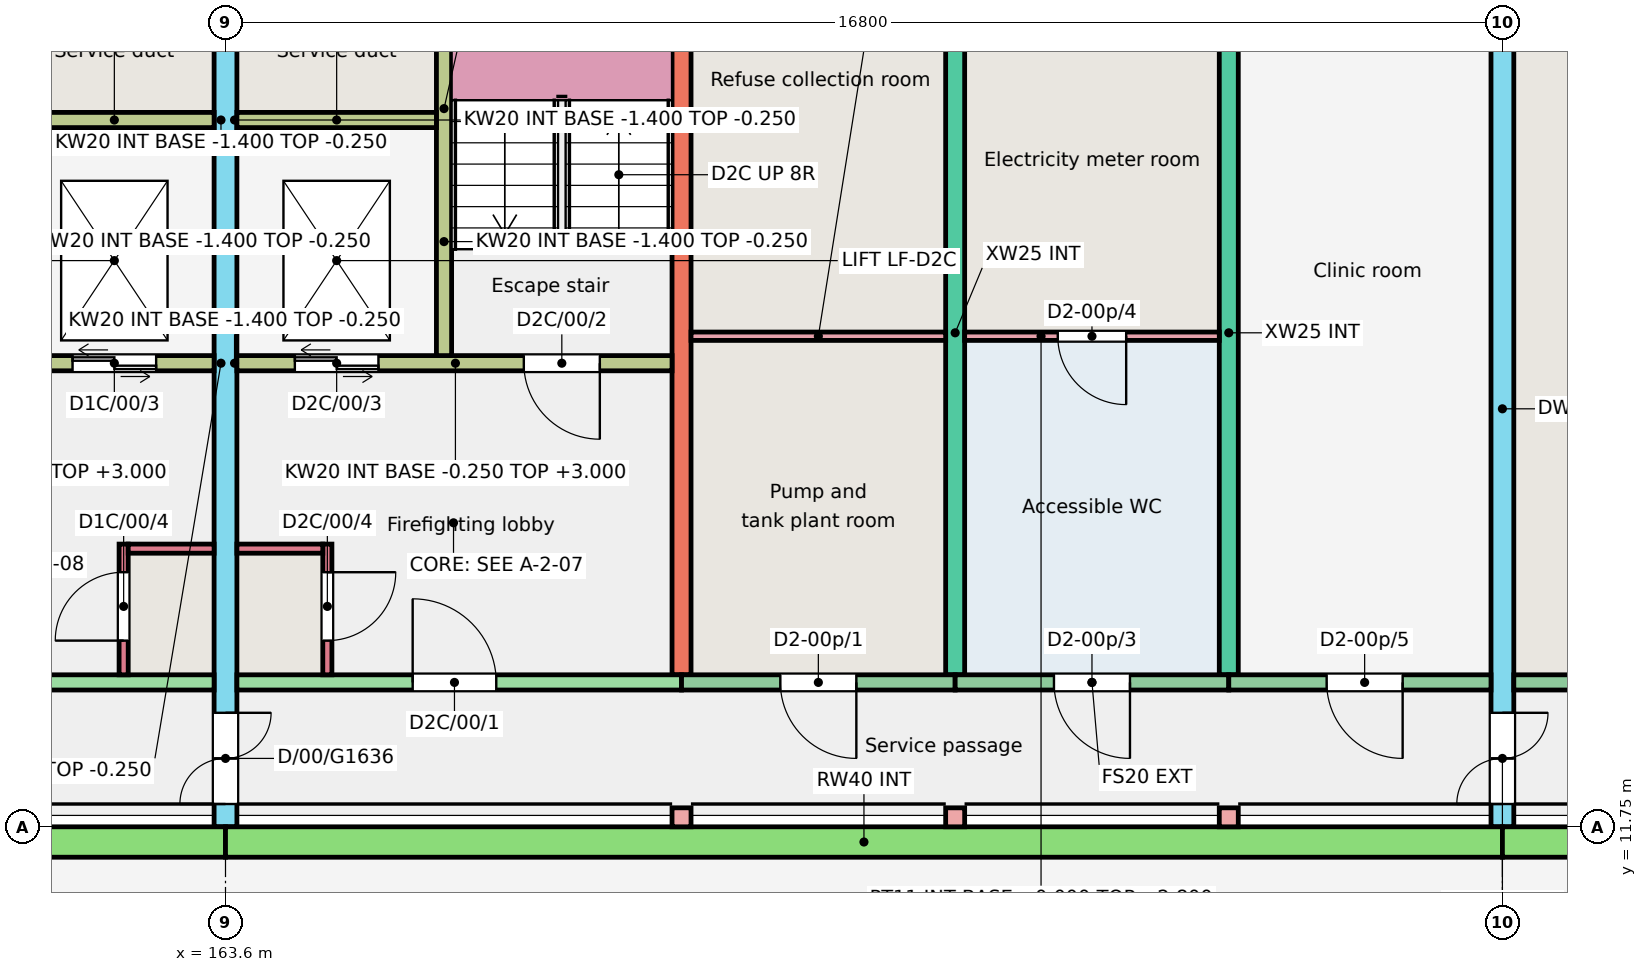
"""IFC4 building model, lengths in metres.
Left out: names, types, materials, properties, quantities, classifications, styles, units other than length and angle.
Written with IfcOpenShell. Run it as: python <this file> out.ifc"""

import sys

from ifc_helpers import new_model, si_unit, direction, frame, frame_2d, origin, origin_2d, place, context, subcontext, project, spatial, rectangle, extrude, element, fill, save


model = new_model("IFC4")
c1 = context("Model", 3, precision=1e-05, world=origin(), true_north=direction((0.0, 1.0)))
c2 = subcontext(c1, "Body", "Model", "MODEL_VIEW")
j1 = project(units=[si_unit("LENGTHUNIT", "METRE"), si_unit("PLANEANGLEUNIT", "RADIAN")], contexts=[c1])
p1 = place(None, origin())
s1 = spatial("IfcSite", under=j1, at=p1, CompositionType="ELEMENT")
p2 = place(p1, origin())
s2 = spatial("IfcBuilding", under=s1, at=p2, CompositionType="ELEMENT")
p3 = place(p2, origin())
s3 = spatial("IfcBuildingStorey", under=s2, at=p3, CompositionType="ELEMENT", Elevation=0.0)
p4 = place(p3, frame((163.6, 11.75, -0.25), z_axis=(0.0, 0.0, 1.0), x_axis=(0.0, 1.0, 0.0)))
e1 = element("IfcWall", 1, at=p4, inside=s3, PredefinedType="SHEAR", context=c2, shape_type="SweptSolid", body=[
    extrude(rectangle(XDim=11.0, YDim=0.3, at=frame_2d((5.5, 0.0))), origin(), (0.0, 0.0, 1.0), 3.25),
])
p5 = place(p4, frame((0.3, 0.0, 0.25)))
e2 = element("IfcOpeningElement", 2, at=p5, cuts=e1, PredefinedType="OPENING", context=c2, shape_type="SweptSolid", body=[
    extrude(rectangle(XDim=1.2, YDim=2.1, at=frame_2d((0.6, 1.05))), frame((0.0, 0.16, 0.0), z_axis=(0.0, -1.0, 0.0), x_axis=(1.0, 0.0, 0.0)), (0.0, 0.0, 1.0), 0.32),
])
for number, where, z_axis, x_axis in (
    (3, (169.6, 13.75, -0.25), (0.0, 0.0, 1.0), (0.0, 1.0, 0.0)),
    (4, (173.2, 13.75, -0.25), (0.0, 0.0, 1.0), (0.0, 1.0, 0.0)),
    (5, (176.8, 13.75, -0.25), (0.0, 0.0, 1.0), (0.0, 1.0, 0.0)),
):
    element("IfcWall", number, at=place(p3, frame(where, z_axis=z_axis, x_axis=x_axis)), inside=s3, PredefinedType="SHEAR", context=c2, shape_type="SweptSolid", body=[
        extrude(rectangle(XDim=9.0, YDim=0.25, at=frame_2d((4.5, 0.0))), origin(), (0.0, 0.0, 1.0), 3.25),
    ])
p6 = place(p3, frame((180.4, 11.75, -0.25), z_axis=(0.0, 0.0, 1.0), x_axis=(0.0, 1.0, 0.0)))
e6 = element("IfcWall", 6, at=p6, inside=s3, PredefinedType="SHEAR", context=c2, shape_type="SweptSolid", body=[
    extrude(rectangle(XDim=11.0, YDim=0.3, at=frame_2d((5.5, 0.0))), origin(), (0.0, 0.0, 1.0), 3.25),
])
p7 = place(p6, frame((0.3, 0.0, 0.25)))
e7 = element("IfcOpeningElement", 7, at=p7, cuts=e6, PredefinedType="OPENING", context=c2, shape_type="SweptSolid", body=[
    extrude(rectangle(XDim=1.2, YDim=2.1, at=frame_2d((0.6, 1.05))), frame((0.0, 0.16, 0.0), z_axis=(0.0, -1.0, 0.0), x_axis=(1.0, 0.0, 0.0)), (0.0, 0.0, 1.0), 0.32),
])
p8 = place(p3, frame((157.6, 13.65, -0.25), z_axis=(0.0, 0.0, 1.0), x_axis=(1.0, 0.0, 0.0)))
e8 = element("IfcWall", 8, at=p8, inside=s3, PredefinedType="SHEAR", context=c2, shape_type="SweptSolid", body=[
    extrude(rectangle(XDim=5.85, YDim=0.2, at=frame_2d((2.925, 0.0))), origin(), (0.0, 0.0, 1.0), 3.25),
])
p9 = place(p8, frame((2.438, 0.0, 0.25)))
e9 = element("IfcOpeningElement", 9, at=p9, cuts=e8, PredefinedType="OPENING", context=c2, shape_type="SweptSolid", body=[
    extrude(rectangle(XDim=1.1, YDim=2.1, at=frame_2d((0.55, 1.05))), frame((0.0, 0.11, 0.0), z_axis=(0.0, -1.0, 0.0), x_axis=(1.0, 0.0, 0.0)), (0.0, 0.0, 1.0), 0.22),
])
p10 = place(p3, frame((157.725, 17.85, -0.25), z_axis=(0.0, 0.0, 1.0), x_axis=(1.0, 0.0, 0.0)))
e10 = element("IfcWall", 10, at=p10, inside=s3, PredefinedType="SHEAR", context=c2, shape_type="SweptSolid", body=[
    extrude(rectangle(XDim=5.725, YDim=0.2, at=frame_2d((2.862, 0.0))), origin(), (0.0, 0.0, 1.0), 3.25),
])
p11 = place(p10, frame((0.95, 0.0, 0.25)))
e11 = element("IfcOpeningElement", 11, at=p11, cuts=e10, PredefinedType="OPENING", context=c2, shape_type="SweptSolid", body=[
    extrude(rectangle(XDim=1.0, YDim=2.1, at=frame_2d((0.5, 1.05))), frame((0.0, 0.11, 0.0), z_axis=(0.0, -1.0, 0.0), x_axis=(1.0, 0.0, 0.0)), (0.0, 0.0, 1.0), 0.22),
])
p12 = place(p10, frame((3.863, 0.0, 0.25)))
e12 = element("IfcOpeningElement", 12, at=p12, cuts=e10, PredefinedType="OPENING", context=c2, shape_type="SweptSolid", body=[
    extrude(rectangle(XDim=1.1, YDim=2.1, at=frame_2d((0.55, 1.05))), frame((0.0, 0.11, 0.0), z_axis=(0.0, -1.0, 0.0), x_axis=(1.0, 0.0, 0.0)), (0.0, 0.0, 1.0), 0.22),
])
p13 = place(p3, frame((160.825, 21.05, -0.25), z_axis=(0.0, 0.0, 1.0), x_axis=(1.0, 0.0, 0.0)))
e13 = element("IfcWall", 13, at=p13, inside=s3, PredefinedType="SHEAR", context=c2, shape_type="SweptSolid", body=[
    extrude(rectangle(XDim=2.625, YDim=0.2, at=frame_2d((1.312, 0.0))), origin(), (0.0, 0.0, 1.0), 3.25),
])
p14 = place(p3, frame((162.26, 13.75, -0.25), z_axis=(0.0, 0.0, 1.0), x_axis=(0.0, 1.0, 0.0)))
e14 = element("IfcWall", 14, at=p14, inside=s3, PredefinedType="SHEAR", context=c2, shape_type="SweptSolid", body=[
    extrude(rectangle(XDim=1.72, YDim=0.12, at=frame_2d((0.86, 0.0))), origin(), (0.0, 0.0, 1.0), 3.25),
])
p15 = place(p14, frame((0.45, 0.0, 0.25)))
e15 = element("IfcOpeningElement", 15, at=p15, cuts=e14, PredefinedType="OPENING", context=c2, shape_type="SweptSolid", body=[
    extrude(rectangle(XDim=0.9, YDim=2.1, at=frame_2d((0.45, 1.05))), frame((0.0, 0.07, 0.0), z_axis=(0.0, -1.0, 0.0), x_axis=(1.0, 0.0, 0.0)), (0.0, 0.0, 1.0), 0.14),
])
p16 = place(p3, frame((162.32, 15.41, -0.25), z_axis=(0.0, 0.0, 1.0), x_axis=(1.0, 0.0, 0.0)))
e16 = element("IfcWall", 16, at=p16, inside=s3, PredefinedType="SHEAR", context=c2, shape_type="SweptSolid", body=[
    extrude(rectangle(XDim=1.13, YDim=0.12, at=frame_2d((0.565, 0.0))), origin(), (0.0, 0.0, 1.0), 3.25),
])
p17 = place(p3, frame((163.75, 13.65, -0.25), z_axis=(0.0, 0.0, 1.0), x_axis=(1.0, 0.0, 0.0)))
e17 = element("IfcWall", 17, at=p17, inside=s3, PredefinedType="SHEAR", context=c2, shape_type="SweptSolid", body=[
    extrude(rectangle(XDim=5.85, YDim=0.2, at=frame_2d((2.925, 0.0))), origin(), (0.0, 0.0, 1.0), 3.25),
])
p18 = place(p17, frame((2.312, 0.0, 0.25)))
e18 = element("IfcOpeningElement", 18, at=p18, cuts=e17, PredefinedType="OPENING", context=c2, shape_type="SweptSolid", body=[
    extrude(rectangle(XDim=1.1, YDim=2.1, at=frame_2d((0.55, 1.05))), frame((0.0, 0.11, 0.0), z_axis=(0.0, -1.0, 0.0), x_axis=(1.0, 0.0, 0.0)), (0.0, 0.0, 1.0), 0.22),
])
p19 = place(p3, frame((163.75, 17.85, -0.25), z_axis=(0.0, 0.0, 1.0), x_axis=(1.0, 0.0, 0.0)))
e19 = element("IfcWall", 19, at=p19, inside=s3, PredefinedType="SHEAR", context=c2, shape_type="SweptSolid", body=[
    extrude(rectangle(XDim=5.725, YDim=0.2, at=frame_2d((2.863, 0.0))), origin(), (0.0, 0.0, 1.0), 3.25),
])
p20 = place(p19, frame((3.775, 0.0, 0.25)))
e20 = element("IfcOpeningElement", 20, at=p20, cuts=e19, PredefinedType="OPENING", context=c2, shape_type="SweptSolid", body=[
    extrude(rectangle(XDim=1.0, YDim=2.1, at=frame_2d((0.5, 1.05))), frame((0.0, 0.11, 0.0), z_axis=(0.0, -1.0, 0.0), x_axis=(1.0, 0.0, 0.0)), (0.0, 0.0, 1.0), 0.22),
])
p21 = place(p19, frame((0.762, 0.0, 0.25)))
e21 = element("IfcOpeningElement", 21, at=p21, cuts=e19, PredefinedType="OPENING", context=c2, shape_type="SweptSolid", body=[
    extrude(rectangle(XDim=1.1, YDim=2.1, at=frame_2d((0.55, 1.05))), frame((0.0, 0.11, 0.0), z_axis=(0.0, -1.0, 0.0), x_axis=(1.0, 0.0, 0.0)), (0.0, 0.0, 1.0), 0.22),
])
p22 = place(p3, frame((166.475, 17.95, -0.25), z_axis=(0.0, 0.0, 1.0), x_axis=(0.0, 1.0, 0.0)))
e22 = element("IfcWall", 22, at=p22, inside=s3, PredefinedType="SHEAR", context=c2, shape_type="SweptSolid", body=[
    extrude(rectangle(XDim=4.8, YDim=0.2, at=frame_2d((2.4, 0.0))), origin(), (0.0, 0.0, 1.0), 3.25),
])
p23 = place(p3, frame((163.75, 21.05, -0.25), z_axis=(0.0, 0.0, 1.0), x_axis=(1.0, 0.0, 0.0)))
e23 = element("IfcWall", 23, at=p23, inside=s3, PredefinedType="SHEAR", context=c2, shape_type="SweptSolid", body=[
    extrude(rectangle(XDim=2.625, YDim=0.2, at=frame_2d((1.312, 0.0))), origin(), (0.0, 0.0, 1.0), 3.25),
])
p24 = place(p3, frame((164.94, 13.75, -0.25), z_axis=(0.0, 0.0, 1.0), x_axis=(0.0, 1.0, 0.0)))
e24 = element("IfcWall", 24, at=p24, inside=s3, PredefinedType="SHEAR", context=c2, shape_type="SweptSolid", body=[
    extrude(rectangle(XDim=1.72, YDim=0.12, at=frame_2d((0.86, 0.0))), origin(), (0.0, 0.0, 1.0), 3.25),
])
p25 = place(p24, frame((0.45, 0.0, 0.25)))
e25 = element("IfcOpeningElement", 25, at=p25, cuts=e24, PredefinedType="OPENING", context=c2, shape_type="SweptSolid", body=[
    extrude(rectangle(XDim=0.9, YDim=2.1, at=frame_2d((0.45, 1.05))), frame((0.0, 0.07, 0.0), z_axis=(0.0, -1.0, 0.0), x_axis=(1.0, 0.0, 0.0)), (0.0, 0.0, 1.0), 0.14),
])
p26 = place(p3, frame((163.75, 15.41, -0.25), z_axis=(0.0, 0.0, 1.0), x_axis=(1.0, 0.0, 0.0)))
e26 = element("IfcWall", 26, at=p26, inside=s3, PredefinedType="SHEAR", context=c2, shape_type="SweptSolid", body=[
    extrude(rectangle(XDim=1.13, YDim=0.12, at=frame_2d((0.565, 0.0))), origin(), (0.0, 0.0, 1.0), 3.25),
])
p27 = place(p3, frame((169.6, 13.65, -0.25), z_axis=(0.0, 0.0, 1.0), x_axis=(1.0, 0.0, 0.0)))
e27 = element("IfcWall", 27, at=p27, inside=s3, PredefinedType="SOLIDWALL", context=c2, shape_type="SweptSolid", body=[
    extrude(rectangle(XDim=3.6, YDim=0.2, at=frame_2d((1.8, 0.0))), origin(), (0.0, 0.0, 1.0), 3.25),
])
p28 = place(p27, frame((1.3, 0.0, 0.25)))
e28 = element("IfcOpeningElement", 28, at=p28, cuts=e27, PredefinedType="OPENING", context=c2, shape_type="SweptSolid", body=[
    extrude(rectangle(XDim=1.0, YDim=2.1, at=frame_2d((0.5, 1.05))), frame((0.0, 0.11, 0.0), z_axis=(0.0, -1.0, 0.0), x_axis=(1.0, 0.0, 0.0)), (0.0, 0.0, 1.0), 0.22),
])
p29 = place(p3, frame((173.2, 13.65, -0.25), z_axis=(0.0, 0.0, 1.0), x_axis=(1.0, 0.0, 0.0)))
e29 = element("IfcWall", 29, at=p29, inside=s3, PredefinedType="SOLIDWALL", context=c2, shape_type="SweptSolid", body=[
    extrude(rectangle(XDim=3.6, YDim=0.2, at=frame_2d((1.8, 0.0))), origin(), (0.0, 0.0, 1.0), 3.25),
])
p30 = place(p29, frame((1.3, 0.0, 0.25)))
e30 = element("IfcOpeningElement", 30, at=p30, cuts=e29, PredefinedType="OPENING", context=c2, shape_type="SweptSolid", body=[
    extrude(rectangle(XDim=1.0, YDim=2.1, at=frame_2d((0.5, 1.05))), frame((0.0, 0.11, 0.0), z_axis=(0.0, -1.0, 0.0), x_axis=(1.0, 0.0, 0.0)), (0.0, 0.0, 1.0), 0.22),
])
p31 = place(p3, frame((176.8, 13.65, -0.25), z_axis=(0.0, 0.0, 1.0), x_axis=(1.0, 0.0, 0.0)))
e31 = element("IfcWall", 31, at=p31, inside=s3, PredefinedType="SOLIDWALL", context=c2, shape_type="SweptSolid", body=[
    extrude(rectangle(XDim=3.45, YDim=0.2, at=frame_2d((1.725, 0.0))), origin(), (0.0, 0.0, 1.0), 3.25),
])
p32 = place(p31, frame((1.288, 0.0, 0.25)))
e32 = element("IfcOpeningElement", 32, at=p32, cuts=e31, PredefinedType="OPENING", context=c2, shape_type="SweptSolid", body=[
    extrude(rectangle(XDim=1.0, YDim=2.1, at=frame_2d((0.5, 1.05))), frame((0.0, 0.11, 0.0), z_axis=(0.0, -1.0, 0.0), x_axis=(1.0, 0.0, 0.0)), (0.0, 0.0, 1.0), 0.22),
])
p33 = place(p3, frame((180.55, 13.65, -0.25), z_axis=(0.0, 0.0, 1.0), x_axis=(1.0, 0.0, 0.0)))
e33 = element("IfcWall", 33, at=p33, inside=s3, PredefinedType="SOLIDWALL", context=c2, shape_type="SweptSolid", body=[
    extrude(rectangle(XDim=3.45, YDim=0.2, at=frame_2d((1.725, 0.0))), origin(), (0.0, 0.0, 1.0), 3.25),
])
p34 = place(p33, frame((1.163, 0.0, 0.25)))
e34 = element("IfcOpeningElement", 34, at=p34, cuts=e33, PredefinedType="OPENING", context=c2, shape_type="SweptSolid", body=[
    extrude(rectangle(XDim=1.0, YDim=2.1, at=frame_2d((0.5, 1.05))), frame((0.0, 0.11, 0.0), z_axis=(0.0, -1.0, 0.0), x_axis=(1.0, 0.0, 0.0)), (0.0, 0.0, 1.0), 0.22),
])
for number, where, z_axis, x_axis in (
    (35, (169.6, 11.875, -0.25), (0.0, 0.0, 1.0), (1.0, 0.0, 0.0)),
    (36, (173.2, 11.875, -0.25), (0.0, 0.0, 1.0), (1.0, 0.0, 0.0)),
    (37, (176.8, 11.875, -0.25), (0.0, 0.0, 1.0), (1.0, 0.0, 0.0)),
):
    element("IfcColumn", number, at=place(p3, frame(where, z_axis=z_axis, x_axis=x_axis)), inside=s3, PredefinedType="COLUMN", context=c2, shape_type="SweptSolid", body=[
        extrude(rectangle(XDim=0.25, YDim=0.25, at=origin_2d()), origin(), (0.0, 0.0, 1.0), 3.25),
    ])
for number, where, z_axis, x_axis in (
    (38, (160.625, 17.85, -1.4), (0.0, 0.0, 1.0), (1.0, 0.0, 0.0)),
    (39, (160.625, 21.05, -1.4), (0.0, 0.0, 1.0), (1.0, 0.0, 0.0)),
):
    element("IfcWall", number, at=place(p3, frame(where, z_axis=z_axis, x_axis=x_axis)), inside=s3, PredefinedType="SHEAR", context=c2, shape_type="SweptSolid", body=[
        extrude(rectangle(XDim=2.975, YDim=0.2, at=frame_2d((1.488, 0.0))), origin(), (0.0, 0.0, 1.0), 1.15),
    ])
p35 = place(p3, frame((163.525, 17.95, -1.4), z_axis=(0.0, 0.0, 1.0), x_axis=(0.0, 1.0, 0.0)))
e40 = element("IfcWall", 40, at=p35, inside=s3, PredefinedType="SHEAR", context=c2, shape_type="SweptSolid", body=[
    extrude(rectangle(XDim=3.0, YDim=0.15, at=frame_2d((1.5, 0.0))), origin(), (0.0, 0.0, 1.0), 1.15),
])
for number, where, z_axis, x_axis in (
    (41, (163.6, 17.85, -1.4), (0.0, 0.0, 1.0), (1.0, 0.0, 0.0)),
    (42, (163.6, 21.05, -1.4), (0.0, 0.0, 1.0), (1.0, 0.0, 0.0)),
):
    element("IfcWall", number, at=place(p3, frame(where, z_axis=z_axis, x_axis=x_axis)), inside=s3, PredefinedType="SHEAR", context=c2, shape_type="SweptSolid", body=[
        extrude(rectangle(XDim=2.975, YDim=0.2, at=frame_2d((1.487, 0.0))), origin(), (0.0, 0.0, 1.0), 1.15),
    ])
p36 = place(p3, frame((166.475, 17.95, -1.4), z_axis=(0.0, 0.0, 1.0), x_axis=(0.0, 1.0, 0.0)))
e43 = element("IfcWall", 43, at=p36, inside=s3, PredefinedType="SHEAR", context=c2, shape_type="SweptSolid", body=[
    extrude(rectangle(XDim=3.0, YDim=0.2, at=frame_2d((1.5, 0.0))), origin(), (0.0, 0.0, 1.0), 1.15),
])
p37 = place(p3, frame((163.675, 17.95, -1.4), z_axis=(0.0, 0.0, 1.0), x_axis=(0.0, 1.0, 0.0)))
e44 = element("IfcWall", 44, at=p37, inside=s3, PredefinedType="SHEAR", context=c2, shape_type="SweptSolid", body=[
    extrude(rectangle(XDim=3.0, YDim=0.15, at=frame_2d((1.5, 0.0))), origin(), (0.0, 0.0, 1.0), 1.15),
])
p38 = place(p3, frame((146.8, 11.55, -0.25), z_axis=(0.0, 0.0, 1.0), x_axis=(1.0, 0.0, 0.0)))
e45 = element("IfcWall", 45, at=p38, inside=s3, PredefinedType="SOLIDWALL", context=c2, shape_type="SweptSolid", body=[
    extrude(rectangle(XDim=16.8, YDim=0.4, at=frame_2d((8.4, 0.0))), origin(), (0.0, 0.0, 1.0), 3.25),
])
p39 = place(p3, frame((163.6, 11.55, -0.25), z_axis=(0.0, 0.0, 1.0), x_axis=(1.0, 0.0, 0.0)))
e46 = element("IfcWall", 46, at=p39, inside=s3, PredefinedType="SOLIDWALL", context=c2, shape_type="SweptSolid", body=[
    extrude(rectangle(XDim=16.8, YDim=0.4, at=frame_2d((8.4, 0.0))), origin(), (0.0, 0.0, 1.0), 3.25),
])
p40 = place(p3, frame((180.4, 11.55, -0.25), z_axis=(0.0, 0.0, 1.0), x_axis=(1.0, 0.0, 0.0)))
e47 = element("IfcWall", 47, at=p40, inside=s3, PredefinedType="SOLIDWALL", context=c2, shape_type="SweptSolid", body=[
    extrude(rectangle(XDim=16.8, YDim=0.4, at=frame_2d((8.4, 0.0))), origin(), (0.0, 0.0, 1.0), 3.25),
])
p41 = place(p3, frame((169.725, 18.205, 0.0), z_axis=(0.0, 0.0, 1.0), x_axis=(1.0, 0.0, 0.0)))
e48 = element("IfcWall", 48, at=p41, inside=s3, PredefinedType="PARTITIONING", context=c2, shape_type="SweptSolid", body=[
    extrude(rectangle(XDim=3.35, YDim=0.11, at=frame_2d((1.675, 0.0))), origin(), (0.0, 0.0, 1.0), 2.8),
])
p42 = place(p3, frame((173.325, 18.205, 0.0), z_axis=(0.0, 0.0, 1.0), x_axis=(1.0, 0.0, 0.0)))
e49 = element("IfcWall", 49, at=p42, inside=s3, PredefinedType="PARTITIONING", context=c2, shape_type="SweptSolid", body=[
    extrude(rectangle(XDim=3.35, YDim=0.11, at=frame_2d((1.675, 0.0))), origin(), (0.0, 0.0, 1.0), 2.8),
])
p43 = place(p42, frame((1.225, 0.0, 0.0)))
e50 = element("IfcOpeningElement", 50, at=p43, cuts=e49, PredefinedType="OPENING", context=c2, shape_type="SweptSolid", body=[
    extrude(rectangle(XDim=0.9, YDim=2.1, at=frame_2d((0.45, 1.05))), frame((0.0, 0.065, 0.0), z_axis=(0.0, -1.0, 0.0), x_axis=(1.0, 0.0, 0.0)), (0.0, 0.0, 1.0), 0.13),
])
p44 = place(p28, origin())
e51 = element("IfcDoor", 51, at=p44, inside=s3, OperationType="SINGLE_SWING_RIGHT", PredefinedType="DOOR", context=c2, shape_type="SweptSolid", body=[
    extrude(rectangle(XDim=1.0, YDim=2.1, at=frame_2d((0.5, 1.05))), frame((0.0, 0.025, 0.0), z_axis=(0.0, -1.0, 0.0), x_axis=(1.0, 0.0, 0.0)), (0.0, 0.0, 1.0), 0.05),
])
fill(e28, e51)
p45 = place(p30, origin())
e52 = element("IfcDoor", 52, at=p45, inside=s3, OperationType="SINGLE_SWING_RIGHT", PredefinedType="DOOR", context=c2, shape_type="SweptSolid", body=[
    extrude(rectangle(XDim=1.0, YDim=2.1, at=frame_2d((0.5, 1.05))), frame((0.0, 0.025, 0.0), z_axis=(0.0, -1.0, 0.0), x_axis=(1.0, 0.0, 0.0)), (0.0, 0.0, 1.0), 0.05),
])
fill(e30, e52)
p46 = place(p43, origin())
e53 = element("IfcDoor", 53, at=p46, inside=s3, OperationType="SINGLE_SWING_RIGHT", PredefinedType="DOOR", context=c2, shape_type="SweptSolid", body=[
    extrude(rectangle(XDim=0.9, YDim=2.1, at=frame_2d((0.45, 1.05))), frame((0.0, 0.025, 0.0), z_axis=(0.0, -1.0, 0.0), x_axis=(1.0, 0.0, 0.0)), (0.0, 0.0, 1.0), 0.05),
])
fill(e50, e53)
p47 = place(p32, origin())
e54 = element("IfcDoor", 54, at=p47, inside=s3, OperationType="SINGLE_SWING_RIGHT", PredefinedType="DOOR", context=c2, shape_type="SweptSolid", body=[
    extrude(rectangle(XDim=1.0, YDim=2.1, at=frame_2d((0.5, 1.05))), frame((0.0, 0.025, 0.0), z_axis=(0.0, -1.0, 0.0), x_axis=(1.0, 0.0, 0.0)), (0.0, 0.0, 1.0), 0.05),
])
fill(e32, e54)
p48 = place(p12, origin())
e55 = element("IfcDoor", 55, at=p48, inside=s3, OperationType="DOUBLE_DOOR_SLIDING", PredefinedType="DOOR", context=c2, shape_type="SweptSolid", body=[
    extrude(rectangle(XDim=1.1, YDim=2.1, at=frame_2d((0.55, 1.05))), frame((0.0, 0.025, 0.0), z_axis=(0.0, -1.0, 0.0), x_axis=(1.0, 0.0, 0.0)), (0.0, 0.0, 1.0), 0.05),
])
fill(e12, e55)
p49 = place(p15, origin())
e56 = element("IfcDoor", 56, at=p49, inside=s3, OperationType="SINGLE_SWING_LEFT", PredefinedType="DOOR", context=c2, shape_type="SweptSolid", body=[
    extrude(rectangle(XDim=0.9, YDim=2.1, at=frame_2d((0.45, 1.05))), frame((0.0, 0.025, 0.0), z_axis=(0.0, -1.0, 0.0), x_axis=(1.0, 0.0, 0.0)), (0.0, 0.0, 1.0), 0.05),
])
fill(e15, e56)
p50 = place(p18, origin())
e57 = element("IfcDoor", 57, at=p50, inside=s3, OperationType="SINGLE_SWING_LEFT", PredefinedType="DOOR", context=c2, shape_type="SweptSolid", body=[
    extrude(rectangle(XDim=1.1, YDim=2.1, at=frame_2d((0.55, 1.05))), frame((0.0, 0.025, 0.0), z_axis=(0.0, -1.0, 0.0), x_axis=(1.0, 0.0, 0.0)), (0.0, 0.0, 1.0), 0.05),
])
fill(e18, e57)
p51 = place(p20, origin())
e58 = element("IfcDoor", 58, at=p51, inside=s3, OperationType="SINGLE_SWING_RIGHT", PredefinedType="DOOR", context=c2, shape_type="SweptSolid", body=[
    extrude(rectangle(XDim=1.0, YDim=2.1, at=frame_2d((0.5, 1.05))), frame((0.0, 0.025, 0.0), z_axis=(0.0, -1.0, 0.0), x_axis=(1.0, 0.0, 0.0)), (0.0, 0.0, 1.0), 0.05),
])
fill(e20, e58)
p52 = place(p21, origin())
e59 = element("IfcDoor", 59, at=p52, inside=s3, OperationType="DOUBLE_DOOR_SLIDING", PredefinedType="DOOR", context=c2, shape_type="SweptSolid", body=[
    extrude(rectangle(XDim=1.1, YDim=2.1, at=frame_2d((0.55, 1.05))), frame((0.0, 0.025, 0.0), z_axis=(0.0, -1.0, 0.0), x_axis=(1.0, 0.0, 0.0)), (0.0, 0.0, 1.0), 0.05),
])
fill(e21, e59)
p53 = place(p25, origin())
e60 = element("IfcDoor", 60, at=p53, inside=s3, OperationType="SINGLE_SWING_RIGHT", PredefinedType="DOOR", context=c2, shape_type="SweptSolid", body=[
    extrude(rectangle(XDim=0.9, YDim=2.1, at=frame_2d((0.45, 1.05))), frame((0.0, 0.025, 0.0), z_axis=(0.0, -1.0, 0.0), x_axis=(1.0, 0.0, 0.0)), (0.0, 0.0, 1.0), 0.05),
])
fill(e25, e60)
p54 = place(p5, origin())
e61 = element("IfcDoor", 61, at=p54, inside=s3, OperationType="DOUBLE_DOOR_SINGLE_SWING", PredefinedType="DOOR", context=c2, shape_type="SweptSolid", body=[
    extrude(rectangle(XDim=1.2, YDim=2.1, at=frame_2d((0.6, 1.05))), frame((0.0, 0.025, 0.0), z_axis=(0.0, -1.0, 0.0), x_axis=(1.0, 0.0, 0.0)), (0.0, 0.0, 1.0), 0.05),
])
fill(e2, e61)
p55 = place(p7, origin())
e62 = element("IfcDoor", 62, at=p55, inside=s3, OperationType="DOUBLE_DOOR_SINGLE_SWING", PredefinedType="DOOR", context=c2, shape_type="SweptSolid", body=[
    extrude(rectangle(XDim=1.2, YDim=2.1, at=frame_2d((0.6, 1.05))), frame((0.0, 0.025, 0.0), z_axis=(0.0, -1.0, 0.0), x_axis=(1.0, 0.0, 0.0)), (0.0, 0.0, 1.0), 0.05),
])
fill(e7, e62)
save(model, sys.argv[1])
